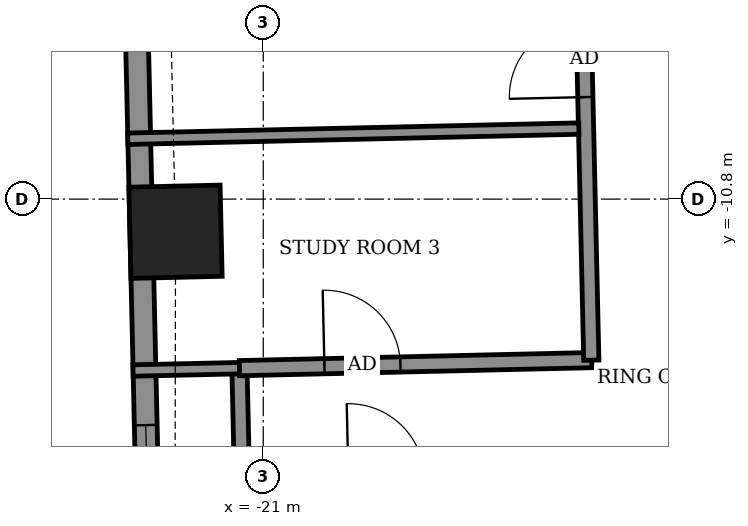
"""IFC4 building model, lengths in metres.
Left out: names, types, materials, properties, quantities, classifications, styles, units other than length and angle.
Written with IfcOpenShell. Run it as: python <this file> out.ifc"""

import sys

from ifc_helpers import new_model, si_unit, direction, frame, frame_2d, origin, origin_2d, place, context, subcontext, project, spatial, rectangle, extrude, element, fill, save


model = new_model("IFC4")
c1 = context("Model", 3, precision=1e-05, world=origin(), true_north=direction((0.0, 1.0)))
c2 = subcontext(c1, "Body", "Model", "MODEL_VIEW")
j1 = project(units=[si_unit("LENGTHUNIT", "METRE"), si_unit("PLANEANGLEUNIT", "RADIAN")], contexts=[c1])
p1 = place(None, origin())
s1 = spatial("IfcSite", under=j1, at=p1, CompositionType="ELEMENT")
p2 = place(p1, origin())
s2 = spatial("IfcBuilding", under=s1, at=p2, CompositionType="ELEMENT")
p3 = place(p2, frame((0.0, 0.0, 186.1)))
s3 = spatial("IfcBuildingStorey", under=s2, at=p3, CompositionType="ELEMENT", Elevation=186.1)
p4 = place(p3, frame((-22.154, -11.229, -0.55), z_axis=(0.0, 0.0, 1.0), x_axis=(0.022702688514, -0.999742260752, 0.0)))
e1 = element("IfcColumn", 1, at=p4, inside=s3, PredefinedType="COLUMN", context=c2, shape_type="SweptSolid", body=[
    extrude(rectangle(XDim=1.2, YDim=1.2, at=origin_2d()), origin(), (0.0, 0.0, 1.0), 3.6),
])
p5 = place(p3, frame((-22.729, -5.725, 0.0), z_axis=(0.0, 0.0, 1.0), x_axis=(0.022726014582, -0.999741730779, 0.0)))
e2 = element("IfcWall", 2, at=p5, inside=s3, PredefinedType="SOLIDWALL", context=c2, shape_type="SweptSolid", body=[
    extrude(rectangle(XDim=10.829, YDim=0.3, at=frame_2d((5.414, 0.0))), origin(), (0.0, 0.0, 1.0), 3.05),
])
p6 = place(p5, frame((1.592, 0.0, 0.0)))
e3 = element("IfcOpeningElement", 3, at=p6, cuts=e2, PredefinedType="OPENING", context=c2, shape_type="SweptSolid", body=[
    extrude(rectangle(XDim=1.5, YDim=2.4, at=frame_2d((0.75, 1.2))), frame((0.0, 0.16, 0.0), z_axis=(0.0, -1.0, 0.0), x_axis=(1.0, 0.0, 0.0)), (0.0, 0.0, 1.0), 0.32),
])
p7 = place(p5, frame((8.05, 0.0, 0.9)))
e4 = element("IfcOpeningElement", 4, at=p7, cuts=e2, PredefinedType="OPENING", context=c2, shape_type="SweptSolid", body=[
    extrude(rectangle(XDim=1.2, YDim=1.5, at=frame_2d((0.6, 0.75))), frame((0.0, 0.16, 0.0), z_axis=(0.0, -1.0, 0.0), x_axis=(1.0, 0.0, 0.0)), (0.0, 0.0, 1.0), 0.32),
])
p8 = place(p3, frame((-21.279, -14.523, 0.0), z_axis=(0.0, 0.0, 1.0), x_axis=(0.999742878501, 0.022675468818, 0.0)))
e5 = element("IfcWall", 5, at=p8, inside=s3, PredefinedType="PARTITIONING", context=c2, shape_type="SweptSolid", body=[
    extrude(rectangle(XDim=46.48, YDim=0.2, at=frame_2d((23.24, 0.0))), origin(), (0.0, 0.0, 1.0), 3.05),
])
p9 = place(p8, frame((1.4, 0.0, 0.0)))
e6 = element("IfcOpeningElement", 6, at=p9, cuts=e5, PredefinedType="OPENING", context=c2, shape_type="SweptSolid", body=[
    extrude(rectangle(XDim=1.0, YDim=2.1, at=frame_2d((0.5, 1.05))), frame((0.0, 0.11, 0.0), z_axis=(0.0, -1.0, 0.0), x_axis=(1.0, 0.0, 0.0)), (0.0, 0.0, 1.0), 0.22),
])
p10 = place(p8, frame((5.95, 0.0, 0.0)))
e7 = element("IfcOpeningElement", 7, at=p10, cuts=e5, PredefinedType="OPENING", context=c2, shape_type="SweptSolid", body=[
    extrude(rectangle(XDim=0.9, YDim=2.1, at=frame_2d((0.45, 1.05))), frame((0.0, 0.11, 0.0), z_axis=(0.0, -1.0, 0.0), x_axis=(1.0, 0.0, 0.0)), (0.0, 0.0, 1.0), 0.22),
])
p11 = place(p8, frame((10.575, 0.0, 0.0)))
e8 = element("IfcOpeningElement", 8, at=p11, cuts=e5, PredefinedType="OPENING", context=c2, shape_type="SweptSolid", body=[
    extrude(rectangle(XDim=0.9, YDim=2.1, at=frame_2d((0.45, 1.05))), frame((0.0, 0.11, 0.0), z_axis=(0.0, -1.0, 0.0), x_axis=(1.0, 0.0, 0.0)), (0.0, 0.0, 1.0), 0.22),
])
p12 = place(p8, frame((12.625, 0.0, 0.0)))
e9 = element("IfcOpeningElement", 9, at=p12, cuts=e5, PredefinedType="OPENING", context=c2, shape_type="SweptSolid", body=[
    extrude(rectangle(XDim=0.9, YDim=2.1, at=frame_2d((0.45, 1.05))), frame((0.0, 0.11, 0.0), z_axis=(0.0, -1.0, 0.0), x_axis=(1.0, 0.0, 0.0)), (0.0, 0.0, 1.0), 0.22),
])
p13 = place(p8, frame((19.4, 0.0, 0.0)))
e10 = element("IfcOpeningElement", 10, at=p13, cuts=e5, PredefinedType="OPENING", context=c2, shape_type="SweptSolid", body=[
    extrude(rectangle(XDim=0.9, YDim=2.1, at=frame_2d((0.45, 1.05))), frame((0.0, 0.11, 0.0), z_axis=(0.0, -1.0, 0.0), x_axis=(1.0, 0.0, 0.0)), (0.0, 0.0, 1.0), 0.22),
])
p14 = place(p8, frame((21.375, 0.0, 0.0)))
e11 = element("IfcOpeningElement", 11, at=p14, cuts=e5, PredefinedType="OPENING", context=c2, shape_type="SweptSolid", body=[
    extrude(rectangle(XDim=0.9, YDim=2.1, at=frame_2d((0.45, 1.05))), frame((0.0, 0.11, 0.0), z_axis=(0.0, -1.0, 0.0), x_axis=(1.0, 0.0, 0.0)), (0.0, 0.0, 1.0), 0.22),
])
p15 = place(p8, frame((28.15, 0.0, 0.0)))
e12 = element("IfcOpeningElement", 12, at=p15, cuts=e5, PredefinedType="OPENING", context=c2, shape_type="SweptSolid", body=[
    extrude(rectangle(XDim=0.9, YDim=2.1, at=frame_2d((0.45, 1.05))), frame((0.0, 0.11, 0.0), z_axis=(0.0, -1.0, 0.0), x_axis=(1.0, 0.0, 0.0)), (0.0, 0.0, 1.0), 0.22),
])
p16 = place(p8, frame((30.1, 0.0, 0.0)))
e13 = element("IfcOpeningElement", 13, at=p16, cuts=e5, PredefinedType="OPENING", context=c2, shape_type="SweptSolid", body=[
    extrude(rectangle(XDim=0.9, YDim=2.1, at=frame_2d((0.45, 1.05))), frame((0.0, 0.11, 0.0), z_axis=(0.0, -1.0, 0.0), x_axis=(1.0, 0.0, 0.0)), (0.0, 0.0, 1.0), 0.22),
])
p17 = place(p8, frame((36.875, 0.0, 0.0)))
e14 = element("IfcOpeningElement", 14, at=p17, cuts=e5, PredefinedType="OPENING", context=c2, shape_type="SweptSolid", body=[
    extrude(rectangle(XDim=0.9, YDim=2.1, at=frame_2d((0.45, 1.05))), frame((0.0, 0.11, 0.0), z_axis=(0.0, -1.0, 0.0), x_axis=(1.0, 0.0, 0.0)), (0.0, 0.0, 1.0), 0.22),
])
p18 = place(p8, frame((43.89, 0.0, 0.0)))
e15 = element("IfcOpeningElement", 15, at=p18, cuts=e5, PredefinedType="OPENING", context=c2, shape_type="SweptSolid", body=[
    extrude(rectangle(XDim=1.0, YDim=2.1, at=frame_2d((0.5, 1.05))), frame((0.0, 0.11, 0.0), z_axis=(0.0, -1.0, 0.0), x_axis=(1.0, 0.0, 0.0)), (0.0, 0.0, 1.0), 0.22),
])
p19 = place(p8, frame((39.05, 0.0, 0.0)))
e16 = element("IfcOpeningElement", 16, at=p19, cuts=e5, PredefinedType="OPENING", context=c2, shape_type="SweptSolid", body=[
    extrude(rectangle(XDim=0.9, YDim=2.1, at=frame_2d((0.45, 1.05))), frame((0.0, 0.11, 0.0), z_axis=(0.0, -1.0, 0.0), x_axis=(1.0, 0.0, 0.0)), (0.0, 0.0, 1.0), 0.22),
])
p20 = place(p3, frame((-21.279, -14.523, 0.0), z_axis=(0.0, 0.0, 1.0), x_axis=(-0.022632637625, 0.99974384905, 0.0)))
e17 = element("IfcWall", 17, at=p20, inside=s3, PredefinedType="PARTITIONING", context=c2, shape_type="SweptSolid", body=[
    extrude(rectangle(XDim=1.5, YDim=0.2, at=frame_2d((0.75, 0.0))), origin(), (0.0, 0.0, 1.0), 3.05),
])
p21 = place(p3, frame((-22.713, -13.055, 0.0), z_axis=(0.0, 0.0, 1.0), x_axis=(0.999756172383, 0.022081571112, 0.0)))
e18 = element("IfcWall", 18, at=p21, inside=s3, PredefinedType="PARTITIONING", context=c2, shape_type="SweptSolid", body=[
    extrude(rectangle(XDim=1.404, YDim=0.15, at=frame_2d((0.702, 0.0))), origin(), (0.0, 0.0, 1.0), 2.55),
])
p22 = place(p3, frame((-21.313, -13.024, 0.0), z_axis=(0.0, 0.0, 1.0), x_axis=(0.999738699021, 0.022858995594, 0.0)))
e19 = element("IfcWall", 19, at=p22, inside=s3, PredefinedType="PARTITIONING", context=c2, shape_type="SweptSolid", body=[
    extrude(rectangle(XDim=4.635, YDim=0.2, at=frame_2d((2.318, 0.0))), origin(), (0.0, 0.0, 1.0), 3.05),
])
p23 = place(p22, frame((1.118, 0.0, 0.0)))
e20 = element("IfcOpeningElement", 20, at=p23, cuts=e19, PredefinedType="OPENING", context=c2, shape_type="SweptSolid", body=[
    extrude(rectangle(XDim=1.0, YDim=2.1, at=frame_2d((0.5, 1.05))), frame((0.0, 0.11, 0.0), z_axis=(0.0, -1.0, 0.0), x_axis=(1.0, 0.0, 0.0)), (0.0, 0.0, 1.0), 0.22),
])
p24 = place(p3, frame((-16.684, -12.919, 0.0), z_axis=(0.0, 0.0, 1.0), x_axis=(-0.022694293906, 0.999742451346, 0.0)))
e21 = element("IfcWall", 21, at=p24, inside=s3, PredefinedType="PARTITIONING", context=c2, shape_type="SweptSolid", body=[
    extrude(rectangle(XDim=28.024, YDim=0.2, at=frame_2d((14.012, 0.0))), origin(), (0.0, 0.0, 1.0), 3.05),
])
p25 = place(p24, frame((22.825, 0.0, 0.0)))
e22 = element("IfcOpeningElement", 22, at=p25, cuts=e21, PredefinedType="OPENING", context=c2, shape_type="SweptSolid", body=[
    extrude(rectangle(XDim=1.0, YDim=2.1, at=frame_2d((0.5, 1.05))), frame((0.0, 0.11, 0.0), z_axis=(0.0, -1.0, 0.0), x_axis=(1.0, 0.0, 0.0)), (0.0, 0.0, 1.0), 0.22),
])
p26 = place(p24, frame((26.374, 0.0, 0.0)))
e23 = element("IfcOpeningElement", 23, at=p26, cuts=e21, PredefinedType="OPENING", context=c2, shape_type="SweptSolid", body=[
    extrude(rectangle(XDim=0.9, YDim=2.1, at=frame_2d((0.45, 1.05))), frame((0.0, 0.11, 0.0), z_axis=(0.0, -1.0, 0.0), x_axis=(1.0, 0.0, 0.0)), (0.0, 0.0, 1.0), 0.22),
])
p27 = place(p24, frame((16.7, 0.0, 0.0)))
e24 = element("IfcOpeningElement", 24, at=p27, cuts=e21, PredefinedType="OPENING", context=c2, shape_type="SweptSolid", body=[
    extrude(rectangle(XDim=1.0, YDim=2.1, at=frame_2d((0.5, 1.05))), frame((0.0, 0.11, 0.0), z_axis=(0.0, -1.0, 0.0), x_axis=(1.0, 0.0, 0.0)), (0.0, 0.0, 1.0), 0.22),
])
p28 = place(p24, frame((19.175, 0.0, 0.0)))
e25 = element("IfcOpeningElement", 25, at=p28, cuts=e21, PredefinedType="OPENING", context=c2, shape_type="SweptSolid", body=[
    extrude(rectangle(XDim=0.9, YDim=2.1, at=frame_2d((0.45, 1.05))), frame((0.0, 0.11, 0.0), z_axis=(0.0, -1.0, 0.0), x_axis=(1.0, 0.0, 0.0)), (0.0, 0.0, 1.0), 0.22),
])
p29 = place(p24, frame((14.725, 0.0, 0.0)))
e26 = element("IfcOpeningElement", 26, at=p29, cuts=e21, PredefinedType="OPENING", context=c2, shape_type="SweptSolid", body=[
    extrude(rectangle(XDim=1.0, YDim=2.1, at=frame_2d((0.5, 1.05))), frame((0.0, 0.11, 0.0), z_axis=(0.0, -1.0, 0.0), x_axis=(1.0, 0.0, 0.0)), (0.0, 0.0, 1.0), 0.22),
])
p30 = place(p24, frame((12.625, 0.0, 0.0)))
e27 = element("IfcOpeningElement", 27, at=p30, cuts=e21, PredefinedType="OPENING", context=c2, shape_type="SweptSolid", body=[
    extrude(rectangle(XDim=0.9, YDim=2.1, at=frame_2d((0.45, 1.05))), frame((0.0, 0.11, 0.0), z_axis=(0.0, -1.0, 0.0), x_axis=(1.0, 0.0, 0.0)), (0.0, 0.0, 1.0), 0.22),
])
p31 = place(p24, frame((10.375, 0.0, 0.0)))
e28 = element("IfcOpeningElement", 28, at=p31, cuts=e21, PredefinedType="OPENING", context=c2, shape_type="SweptSolid", body=[
    extrude(rectangle(XDim=1.0, YDim=2.1, at=frame_2d((0.5, 1.05))), frame((0.0, 0.11, 0.0), z_axis=(0.0, -1.0, 0.0), x_axis=(1.0, 0.0, 0.0)), (0.0, 0.0, 1.0), 0.22),
])
p32 = place(p24, frame((8.125, 0.0, 0.0)))
e29 = element("IfcOpeningElement", 29, at=p32, cuts=e21, PredefinedType="OPENING", context=c2, shape_type="SweptSolid", body=[
    extrude(rectangle(XDim=0.9, YDim=2.1, at=frame_2d((0.45, 1.05))), frame((0.0, 0.11, 0.0), z_axis=(0.0, -1.0, 0.0), x_axis=(1.0, 0.0, 0.0)), (0.0, 0.0, 1.0), 0.22),
])
p33 = place(p24, frame((3.462, 0.0, 0.0)))
e30 = element("IfcOpeningElement", 30, at=p33, cuts=e21, PredefinedType="OPENING", context=c2, shape_type="SweptSolid", body=[
    extrude(rectangle(XDim=1.0, YDim=2.1, at=frame_2d((0.5, 1.05))), frame((0.0, 0.11, 0.0), z_axis=(0.0, -1.0, 0.0), x_axis=(1.0, 0.0, 0.0)), (0.0, 0.0, 1.0), 0.22),
])
p34 = place(p24, frame((5.625, 0.0, 0.0)))
e31 = element("IfcOpeningElement", 31, at=p34, cuts=e21, PredefinedType="OPENING", context=c2, shape_type="SweptSolid", body=[
    extrude(rectangle(XDim=0.9, YDim=2.1, at=frame_2d((0.45, 1.05))), frame((0.0, 0.11, 0.0), z_axis=(0.0, -1.0, 0.0), x_axis=(1.0, 0.0, 0.0)), (0.0, 0.0, 1.0), 0.22),
])
p35 = place(p3, frame((-22.782, -10.006, 0.0), z_axis=(0.0, 0.0, 1.0), x_axis=(0.999745010927, 0.02258125611, 0.0)))
e32 = element("IfcWall", 32, at=p35, inside=s3, PredefinedType="PARTITIONING", context=c2, shape_type="SweptSolid", body=[
    extrude(rectangle(XDim=5.936, YDim=0.15, at=frame_2d((2.968, 0.0))), origin(), (0.0, 0.0, 1.0), 2.55),
])
p36 = place(p7, origin())
e33 = element("IfcWindow", 33, at=p36, inside=s3, PartitioningType="SINGLE_PANEL", PredefinedType="WINDOW", context=c2, shape_type="SweptSolid", body=[
    extrude(rectangle(XDim=1.2, YDim=1.5, at=frame_2d((0.6, 0.75))), frame((0.0, 0.03, 0.0), z_axis=(0.0, -1.0, 0.0), x_axis=(1.0, 0.0, 0.0)), (0.0, 0.0, 1.0), 0.06),
])
fill(e4, e33)
p37 = place(p33, origin())
e34 = element("IfcDoor", 34, at=p37, inside=s3, OperationType="SINGLE_SWING_RIGHT", PredefinedType="DOOR", context=c2, shape_type="SweptSolid", body=[
    extrude(rectangle(XDim=1.0, YDim=2.1, at=frame_2d((0.5, 1.05))), frame((0.0, 0.025, 0.0), z_axis=(0.0, -1.0, 0.0), x_axis=(1.0, 0.0, 0.0)), (0.0, 0.0, 1.0), 0.05),
])
fill(e30, e34)
p38 = place(p23, origin())
e35 = element("IfcDoor", 35, at=p38, inside=s3, OperationType="SINGLE_SWING_LEFT", PredefinedType="DOOR", context=c2, shape_type="SweptSolid", body=[
    extrude(rectangle(XDim=1.0, YDim=2.1, at=frame_2d((0.5, 1.05))), frame((0.0, 0.025, 0.0), z_axis=(0.0, -1.0, 0.0), x_axis=(1.0, 0.0, 0.0)), (0.0, 0.0, 1.0), 0.05),
])
fill(e20, e35)
save(model, sys.argv[1])
